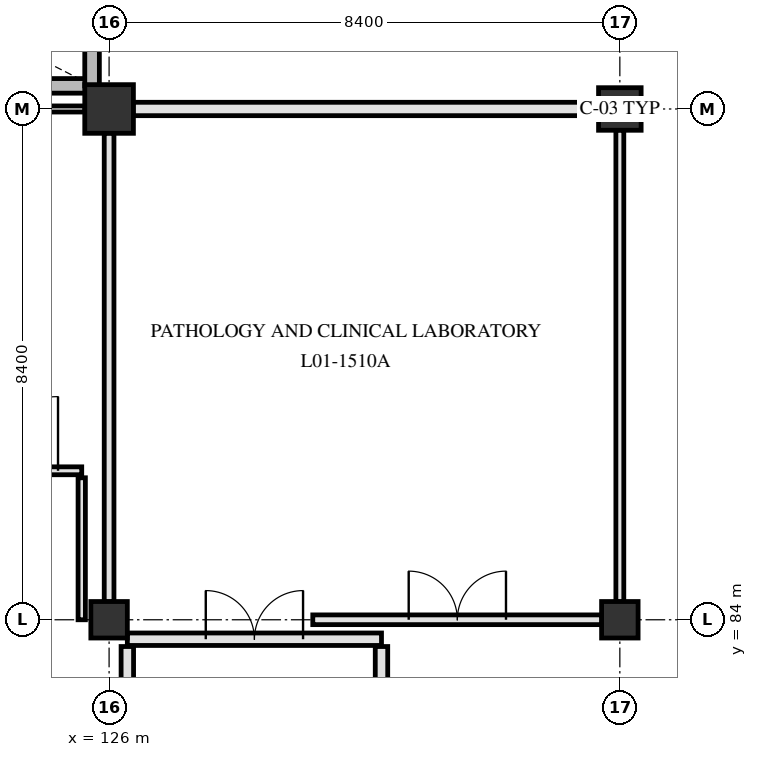
"""IFC4 building model, lengths in metres.
Left out: names, types, materials, properties, quantities, classifications, styles, units other than length and angle.
Written with IfcOpenShell. Run it as: python <this file> out.ifc"""

import sys

from ifc_helpers import new_model, si_unit, direction, frame, frame_2d, origin, origin_2d, place, context, subcontext, project, spatial, rectangle, extrude, element, fill, save


model = new_model("IFC4")
c1 = context("Model", 3, precision=1e-05, world=origin(), true_north=direction((0.0, 1.0)))
c2 = subcontext(c1, "Body", "Model", "MODEL_VIEW")
j1 = project(units=[si_unit("LENGTHUNIT", "METRE"), si_unit("PLANEANGLEUNIT", "RADIAN")], contexts=[c1])
p1 = place(None, origin())
s1 = spatial("IfcSite", under=j1, at=p1, CompositionType="ELEMENT")
p2 = place(p1, origin())
s2 = spatial("IfcBuilding", under=s1, at=p2, CompositionType="ELEMENT")
p3 = place(p2, frame((0.0, 0.0, 4.8)))
s3 = spatial("IfcBuildingStorey", under=s2, at=p3, CompositionType="ELEMENT", Elevation=4.8)
p4 = place(p3, frame((126.0, 84.0, 0.0), z_axis=(0.0, 0.0, 1.0), x_axis=(1.0, 0.0, 0.0)))
e1 = element("IfcColumn", 1, at=p4, inside=s3, PredefinedType="COLUMN", context=c2, shape_type="SweptSolid", body=[
    extrude(rectangle(XDim=0.6, YDim=0.6, at=origin_2d()), origin(), (0.0, 0.0, 1.0), 4.5),
])
p5 = place(p3, frame((126.0, 92.4, 0.0), z_axis=(0.0, 0.0, 1.0), x_axis=(1.0, 0.0, 0.0)))
e2 = element("IfcColumn", 2, at=p5, inside=s3, PredefinedType="COLUMN", context=c2, shape_type="SweptSolid", body=[
    extrude(rectangle(XDim=0.8, YDim=0.8, at=origin_2d()), origin(), (0.0, 0.0, 1.0), 4.5),
])
p6 = place(p3, frame((134.4, 84.0, 0.0), z_axis=(0.0, 0.0, 1.0), x_axis=(1.0, 0.0, 0.0)))
e3 = element("IfcColumn", 3, at=p6, inside=s3, PredefinedType="COLUMN", context=c2, shape_type="SweptSolid", body=[
    extrude(rectangle(XDim=0.6, YDim=0.6, at=origin_2d()), origin(), (0.0, 0.0, 1.0), 4.5),
])
p7 = place(p3, frame((134.4, 92.4, 0.0), z_axis=(0.0, 0.0, 1.0), x_axis=(1.0, 0.0, 0.0)))
e4 = element("IfcColumn", 4, at=p7, inside=s3, PredefinedType="COLUMN", context=c2, shape_type="SweptSolid", body=[
    extrude(rectangle(XDim=0.7, YDim=0.7, at=origin_2d()), origin(), (0.0, 0.0, 1.0), 4.5),
])
p8 = place(p3, frame((117.9, 92.78, 0.0), z_axis=(0.0, 0.0, 1.0), x_axis=(1.0, 0.0, 0.0)))
e5 = element("IfcWall", 5, at=p8, inside=s3, PredefinedType="SHEAR", context=c2, shape_type="SweptSolid", body=[
    extrude(rectangle(XDim=7.82, YDim=0.24, at=frame_2d((3.91, 0.0))), origin(), (0.0, 0.0, 1.0), 4.15),
])
p9 = place(p3, frame((125.72, 92.78, 0.0), z_axis=(0.0, 0.0, 1.0), x_axis=(0.0, 1.0, 0.0)))
e6 = element("IfcWall", 6, at=p9, inside=s3, PredefinedType="SHEAR", context=c2, shape_type="SweptSolid", body=[
    extrude(rectangle(XDim=3.32, YDim=0.24, at=frame_2d((1.66, 0.0))), origin(), (0.0, 0.0, 1.0), 4.15),
])
p10 = place(p3, frame((130.48, 79.44, 0.0), z_axis=(0.0, 0.0, 1.0), x_axis=(0.0, 1.0, 0.0)))
e7 = element("IfcWall", 7, at=p10, inside=s3, PredefinedType="PARTITIONING", context=c2, shape_type="SweptSolid", body=[
    extrude(rectangle(XDim=4.12, YDim=0.205, at=frame_2d((2.06, 0.0))), origin(), (0.0, 0.0, 1.0), 4.14),
])
p11 = place(p3, frame((126.3, 79.44, 0.0), z_axis=(0.0, 0.0, 1.0), x_axis=(0.0, 1.0, 0.0)))
e8 = element("IfcWall", 8, at=p11, inside=s3, PredefinedType="PARTITIONING", context=c2, shape_type="SweptSolid", body=[
    extrude(rectangle(XDim=4.12, YDim=0.205, at=frame_2d((2.06, 0.0))), origin(), (0.0, 0.0, 1.0), 3.59),
])
p12 = place(p3, frame((126.3, 83.68, 0.0), z_axis=(0.0, 0.0, 1.0), x_axis=(1.0, 0.0, 0.0)))
e9 = element("IfcWall", 9, at=p12, inside=s3, PredefinedType="PARTITIONING", context=c2, shape_type="SweptSolid", body=[
    extrude(rectangle(XDim=4.18, YDim=0.205, at=frame_2d((2.09, 0.0))), origin(), (0.0, 0.0, 1.0), 3.54),
])
p13 = place(p12, frame((1.29, 0.0, 0.0)))
e10 = element("IfcOpeningElement", 10, at=p13, cuts=e9, PredefinedType="OPENING", context=c2, shape_type="SweptSolid", body=[
    extrude(rectangle(XDim=1.6, YDim=2.25, at=frame_2d((0.8, 1.125))), frame((0.0, 0.113, 0.0), z_axis=(0.0, -1.0, 0.0), x_axis=(1.0, 0.0, 0.0)), (0.0, 0.0, 1.0), 0.225),
])
p14 = place(p3, frame((129.35, 84.0, 0.0), z_axis=(0.0, 0.0, 1.0), x_axis=(1.0, 0.0, 0.0)))
e11 = element("IfcWall", 11, at=p14, inside=s3, PredefinedType="PARTITIONING", context=c2, shape_type="SweptSolid", body=[
    extrude(rectangle(XDim=4.755, YDim=0.16, at=frame_2d((2.377, 0.0))), origin(), (0.0, 0.0, 1.0), 3.54),
])
p15 = place(p14, frame((1.577, 0.0, 0.0)))
e12 = element("IfcOpeningElement", 12, at=p15, cuts=e11, PredefinedType="OPENING", context=c2, shape_type="SweptSolid", body=[
    extrude(rectangle(XDim=1.6, YDim=2.25, at=frame_2d((0.8, 1.125))), frame((0.0, 0.09, 0.0), z_axis=(0.0, -1.0, 0.0), x_axis=(1.0, 0.0, 0.0)), (0.0, 0.0, 1.0), 0.18),
])
p16 = place(p3, frame((123.55, 86.45, 0.0), z_axis=(0.0, 0.0, 1.0), x_axis=(1.0, 0.0, 0.0)))
e13 = element("IfcWall", 13, at=p16, inside=s3, PredefinedType="PARTITIONING", context=c2, shape_type="SweptSolid", body=[
    extrude(rectangle(XDim=2.0, YDim=0.13, at=frame_2d((1.0, 0.0))), origin(), (0.0, 0.0, 1.0), 4.14),
])
p17 = place(p16, frame((0.39, 0.0, 0.0)))
e14 = element("IfcOpeningElement", 14, at=p17, cuts=e13, PredefinedType="OPENING", context=c2, shape_type="SweptSolid", body=[
    extrude(rectangle(XDim=1.22, YDim=2.18, at=frame_2d((0.61, 1.09))), frame((0.0, 0.075, 0.0), z_axis=(0.0, -1.0, 0.0), x_axis=(1.0, 0.0, 0.0)), (0.0, 0.0, 1.0), 0.15),
])
p18 = place(p3, frame((117.995, 92.4, 0.0), z_axis=(0.0, 0.0, 1.0), x_axis=(1.0, 0.0, 0.0)))
e15 = element("IfcWall", 15, at=p18, inside=s3, PredefinedType="PARTITIONING", context=c2, shape_type="SweptSolid", body=[
    extrude(rectangle(XDim=7.61, YDim=0.1, at=frame_2d((3.805, 0.0))), origin(), (0.0, 0.0, 1.0), 3.54),
])
p19 = place(p3, frame((126.395, 92.4, 0.0), z_axis=(0.0, 0.0, 1.0), x_axis=(1.0, 0.0, 0.0)))
e16 = element("IfcWall", 16, at=p19, inside=s3, PredefinedType="PARTITIONING", context=c2, shape_type="SweptSolid", body=[
    extrude(rectangle(XDim=7.66, YDim=0.22, at=frame_2d((3.83, 0.0))), origin(), (0.0, 0.0, 1.0), 3.54),
])
p20 = place(p3, frame((125.55, 84.0, 0.0), z_axis=(0.0, 0.0, 1.0), x_axis=(0.0, 1.0, 0.0)))
e17 = element("IfcWall", 17, at=p20, inside=s3, PredefinedType="PARTITIONING", context=c2, shape_type="SweptSolid", body=[
    extrude(rectangle(XDim=2.335, YDim=0.12, at=frame_2d((1.167, 0.0))), origin(), (0.0, 0.0, 1.0), 3.54),
])
p21 = place(p3, frame((126.0, 84.295, 0.0), z_axis=(0.0, 0.0, 1.0), x_axis=(0.0, 1.0, 0.0)))
e18 = element("IfcWall", 18, at=p21, inside=s3, PredefinedType="PARTITIONING", context=c2, shape_type="SweptSolid", body=[
    extrude(rectangle(XDim=7.71, YDim=0.16, at=frame_2d((3.855, 0.0))), origin(), (0.0, 0.0, 1.0), 3.59),
])
p22 = place(p3, frame((134.4, 84.295, 0.0), z_axis=(0.0, 0.0, 1.0), x_axis=(0.0, 1.0, 0.0)))
e19 = element("IfcWall", 19, at=p22, inside=s3, PredefinedType="PARTITIONING", context=c2, shape_type="SweptSolid", body=[
    extrude(rectangle(XDim=7.76, YDim=0.13, at=frame_2d((3.88, 0.0))), origin(), (0.0, 0.0, 1.0), 3.59),
])
p23 = place(p13, origin())
e20 = element("IfcDoor", 20, at=p23, inside=s3, OperationType="DOUBLE_SWING_LEFT", PredefinedType="DOOR", context=c2, shape_type="SweptSolid", body=[
    extrude(rectangle(XDim=1.6, YDim=2.25, at=frame_2d((0.8, 1.125))), frame((0.0, 0.025, 0.0), z_axis=(0.0, -1.0, 0.0), x_axis=(1.0, 0.0, 0.0)), (0.0, 0.0, 1.0), 0.05),
])
fill(e10, e20)
p24 = place(p17, origin())
e21 = element("IfcDoor", 21, at=p24, inside=s3, OperationType="SINGLE_SWING_RIGHT", PredefinedType="DOOR", context=c2, shape_type="SweptSolid", body=[
    extrude(rectangle(XDim=1.22, YDim=2.18, at=frame_2d((0.61, 1.09))), frame((0.0, 0.025, 0.0), z_axis=(0.0, -1.0, 0.0), x_axis=(1.0, 0.0, 0.0)), (0.0, 0.0, 1.0), 0.05),
])
fill(e14, e21)
p25 = place(p15, origin())
e22 = element("IfcDoor", 22, at=p25, inside=s3, OperationType="DOUBLE_SWING_LEFT", PredefinedType="DOOR", context=c2, shape_type="SweptSolid", body=[
    extrude(rectangle(XDim=1.6, YDim=2.25, at=frame_2d((0.8, 1.125))), frame((0.0, 0.025, 0.0), z_axis=(0.0, -1.0, 0.0), x_axis=(1.0, 0.0, 0.0)), (0.0, 0.0, 1.0), 0.05),
])
fill(e12, e22)
save(model, sys.argv[1])
